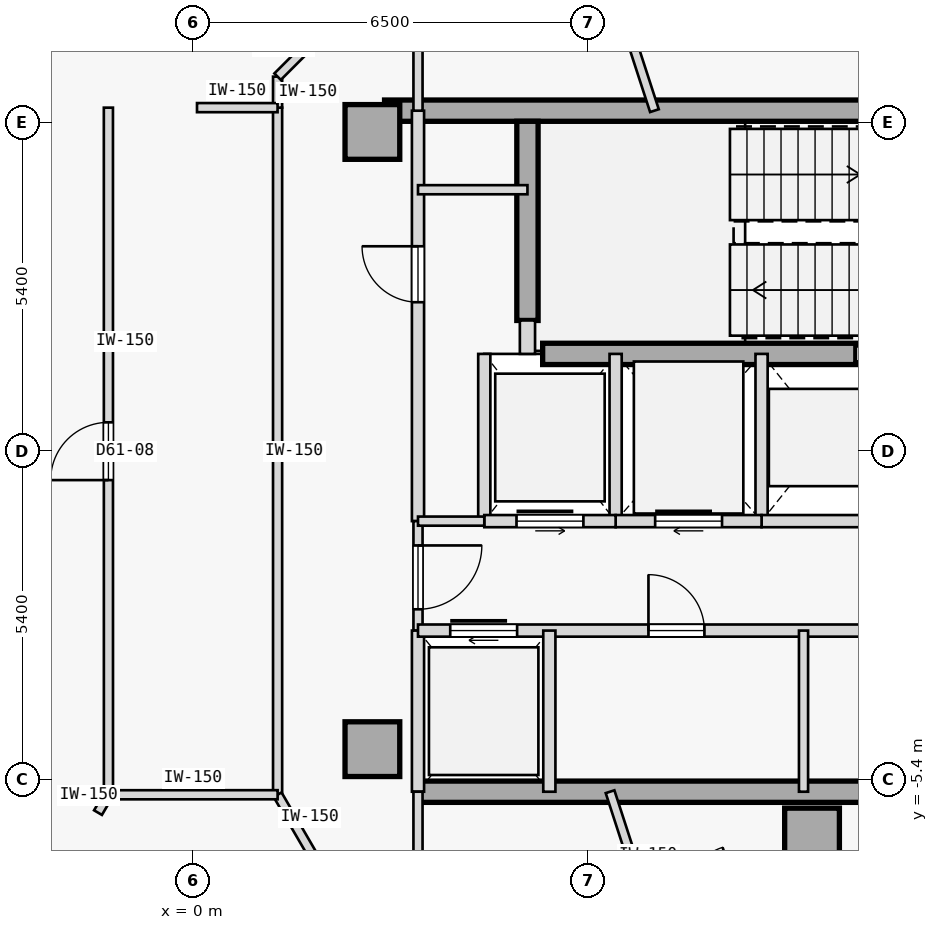
"""IFC4 building model, lengths in metres.
Left out: names, types, materials, properties, quantities, classifications, styles, units other than length and angle.
Written with IfcOpenShell. Run it as: python <this file> out.ifc"""

import sys

from ifc_helpers import new_model, si_unit, direction, frame, frame_2d, origin, origin_2d, place, context, subcontext, project, spatial, rectangle, extrude, element, fill, save


model = new_model("IFC4")
c1 = context("Model", 3, precision=1e-05, world=origin(), true_north=direction((0.0, 1.0)))
c2 = subcontext(c1, "Body", "Model", "MODEL_VIEW")
j1 = project(units=[si_unit("LENGTHUNIT", "METRE"), si_unit("PLANEANGLEUNIT", "RADIAN")], contexts=[c1])
p1 = place(None, origin())
s1 = spatial("IfcSite", under=j1, at=p1, CompositionType="ELEMENT")
p2 = place(p1, origin())
s2 = spatial("IfcBuilding", under=s1, at=p2, CompositionType="ELEMENT")
p3 = place(p2, frame((0.0, 0.0, 231.0)))
s3 = spatial("IfcBuildingStorey", under=s2, at=p3, CompositionType="ELEMENT", Elevation=231.0)
for number, where, z_axis, x_axis in (
    (1, (10.18, -6.32, 0.0), (0.0, 0.0, 1.0), (1.0, 0.0, 0.0)),
    (2, (2.95, -4.9, 0.0), (0.0, 0.0, 1.0), (1.0, 0.0, 0.0)),
    (3, (2.95, 5.25, 0.0), (0.0, 0.0, 1.0), (1.0, 0.0, 0.0)),
):
    element("IfcColumn", number, at=place(p3, frame(where, z_axis=z_axis, x_axis=x_axis)), inside=s3, PredefinedType="COLUMN", context=c2, shape_type="SweptSolid", body=[
        extrude(rectangle(XDim=0.9, YDim=0.9, at=origin_2d()), origin(), (0.0, 0.0, 1.0), 3.35),
    ])
p4 = place(p3, frame((3.15, 5.6, 0.0), z_axis=(0.0, 0.0, 1.0), x_axis=(1.0, 0.0, 0.0)))
e4 = element("IfcWall", 4, at=p4, inside=s3, PredefinedType="SHEAR", context=c2, shape_type="SweptSolid", body=[
    extrude(rectangle(XDim=11.41, YDim=0.35, at=frame_2d((5.705, 0.0))), origin(), (0.0, 0.0, 1.0), 3.125),
])
p5 = place(p3, frame((3.7, -5.6, 0.0), z_axis=(0.0, 0.0, 1.0), x_axis=(1.0, 0.0, 0.0)))
e5 = element("IfcWall", 5, at=p5, inside=s3, PredefinedType="SHEAR", context=c2, shape_type="SweptSolid", body=[
    extrude(rectangle(XDim=10.86, YDim=0.35, at=frame_2d((5.43, 0.0))), origin(), (0.0, 0.0, 1.0), 3.125),
])
p6 = place(p3, frame((5.5, 2.15, 0.0), z_axis=(0.0, 0.0, 1.0), x_axis=(0.0, 1.0, 0.0)))
e6 = element("IfcWall", 6, at=p6, inside=s3, PredefinedType="SHEAR", context=c2, shape_type="SweptSolid", body=[
    extrude(rectangle(XDim=3.275, YDim=0.35, at=frame_2d((1.638, 0.0))), origin(), (0.0, 0.0, 1.0), 3.125),
])
p7 = place(p3, frame((5.75, 1.6, 0.0), z_axis=(0.0, 0.0, 1.0), x_axis=(1.0, 0.0, 0.0)))
e7 = element("IfcWall", 7, at=p7, inside=s3, PredefinedType="SHEAR", context=c2, shape_type="SweptSolid", body=[
    extrude(rectangle(XDim=5.15, YDim=0.35, at=frame_2d((2.575, 0.0))), origin(), (0.0, 0.0, 1.0), 3.125),
])
p8 = place(p3, frame((10.9, 1.6, 0.0), z_axis=(0.0, 0.0, 1.0), x_axis=(1.0, 0.0, 0.0)))
e8 = element("IfcWall", 8, at=p8, inside=s3, PredefinedType="STANDARD", context=c2, shape_type="SweptSolid", body=[
    extrude(rectangle(XDim=3.6, YDim=0.25, at=frame_2d((1.8, 0.0))), origin(), (0.0, 0.0, 1.0), 3.125),
])
p9 = place(p8, frame((1.62, 0.0, 0.0)))
e9 = element("IfcOpeningElement", 9, at=p9, cuts=e8, PredefinedType="OPENING", context=c2, shape_type="SweptSolid", body=[
    extrude(rectangle(XDim=1.05, YDim=2.15, at=frame_2d((0.525, 1.075))), frame((0.0, 0.135, 0.0), z_axis=(0.0, -1.0, 0.0), x_axis=(1.0, 0.0, 0.0)), (0.0, 0.0, 1.0), 0.27),
])
p10 = place(p3, frame((5.5, 1.6, 0.0), z_axis=(0.0, 0.0, 1.0), x_axis=(0.0, 1.0, 0.0)))
e10 = element("IfcWall", 10, at=p10, inside=s3, PredefinedType="STANDARD", context=c2, shape_type="SweptSolid", body=[
    extrude(rectangle(XDim=0.55, YDim=0.25, at=frame_2d((0.275, 0.0))), origin(), (0.0, 0.0, 1.0), 3.125),
])
p11 = place(p3, frame((3.7, -1.15, 0.0), z_axis=(0.0, 0.0, 1.0), x_axis=(0.0, 1.0, 0.0)))
e11 = element("IfcWall", 11, at=p11, inside=s3, PredefinedType="STANDARD", context=c2, shape_type="SweptSolid", body=[
    extrude(rectangle(XDim=6.75, YDim=0.2, at=frame_2d((3.375, 0.0))), origin(), (0.0, 0.0, 1.0), 3.125),
])
p12 = place(p11, frame((3.6, 0.0, 0.0)))
e12 = element("IfcOpeningElement", 12, at=p12, cuts=e11, PredefinedType="OPENING", context=c2, shape_type="SweptSolid", body=[
    extrude(rectangle(XDim=0.92, YDim=2.15, at=frame_2d((0.46, 1.075))), frame((0.0, 0.11, 0.0), z_axis=(0.0, -1.0, 0.0), x_axis=(1.0, 0.0, 0.0)), (0.0, 0.0, 1.0), 0.22),
])
p13 = place(p3, frame((3.7, -2.95, 0.0), z_axis=(0.0, 0.0, 1.0), x_axis=(0.0, 1.0, 0.0)))
e13 = element("IfcWall", 13, at=p13, inside=s3, PredefinedType="PARTITIONING", context=c2, shape_type="SweptSolid", body=[
    extrude(rectangle(XDim=1.8, YDim=0.15, at=frame_2d((0.9, 0.0))), origin(), (0.0, 0.0, 1.0), 3.125),
])
p14 = place(p13, frame((0.35, 0.0, 0.0)))
e14 = element("IfcOpeningElement", 14, at=p14, cuts=e13, PredefinedType="OPENING", context=c2, shape_type="SweptSolid", body=[
    extrude(rectangle(XDim=1.05, YDim=2.18, at=frame_2d((0.525, 1.09))), frame((0.0, 0.085, 0.0), z_axis=(0.0, -1.0, 0.0), x_axis=(1.0, 0.0, 0.0)), (0.0, 0.0, 1.0), 0.17),
])
p15 = place(p3, frame((3.7, -5.6, 0.0), z_axis=(0.0, 0.0, 1.0), x_axis=(0.0, 1.0, 0.0)))
e15 = element("IfcWall", 15, at=p15, inside=s3, PredefinedType="STANDARD", context=c2, shape_type="SweptSolid", body=[
    extrude(rectangle(XDim=2.65, YDim=0.2, at=frame_2d((1.325, 0.0))), origin(), (0.0, 0.0, 1.0), 3.125),
])
p16 = place(p3, frame((9.35, -1.15, 0.0), z_axis=(0.0, 0.0, 1.0), x_axis=(0.0, 1.0, 0.0)))
e16 = element("IfcWall", 16, at=p16, inside=s3, PredefinedType="STANDARD", context=c2, shape_type="SweptSolid", body=[
    extrude(rectangle(XDim=2.75, YDim=0.2, at=frame_2d((1.375, 0.0))), origin(), (0.0, 0.0, 1.0), 3.125),
])
p17 = place(p3, frame((9.35, -1.15, 0.0), z_axis=(0.0, 0.0, 1.0), x_axis=(1.0, 0.0, 0.0)))
e17 = element("IfcWall", 17, at=p17, inside=s3, PredefinedType="STANDARD", context=c2, shape_type="SweptSolid", body=[
    extrude(rectangle(XDim=2.2, YDim=0.2, at=frame_2d((1.1, 0.0))), origin(), (0.0, 0.0, 1.0), 3.125),
])
p18 = place(p3, frame((6.95, -1.15, 0.0), z_axis=(0.0, 0.0, 1.0), x_axis=(0.0, 1.0, 0.0)))
e18 = element("IfcWall", 18, at=p18, inside=s3, PredefinedType="STANDARD", context=c2, shape_type="SweptSolid", body=[
    extrude(rectangle(XDim=2.75, YDim=0.2, at=frame_2d((1.375, 0.0))), origin(), (0.0, 0.0, 1.0), 3.125),
])
p19 = place(p3, frame((6.95, -1.15, 0.0), z_axis=(0.0, 0.0, 1.0), x_axis=(1.0, 0.0, 0.0)))
e19 = element("IfcWall", 19, at=p19, inside=s3, PredefinedType="STANDARD", context=c2, shape_type="SweptSolid", body=[
    extrude(rectangle(XDim=2.4, YDim=0.2, at=frame_2d((1.2, 0.0))), origin(), (0.0, 0.0, 1.0), 3.125),
])
p20 = place(p19, frame((0.65, 0.0, 0.0)))
e20 = element("IfcOpeningElement", 20, at=p20, cuts=e19, PredefinedType="OPENING", context=c2, shape_type="SweptSolid", body=[
    extrude(rectangle(XDim=1.1, YDim=2.15, at=frame_2d((0.55, 1.075))), frame((0.0, 0.11, 0.0), z_axis=(0.0, -1.0, 0.0), x_axis=(1.0, 0.0, 0.0)), (0.0, 0.0, 1.0), 0.22),
])
p21 = place(p3, frame((4.79, -1.15, 0.0), z_axis=(0.0, 0.0, 1.0), x_axis=(0.0, 1.0, 0.0)))
e21 = element("IfcWall", 21, at=p21, inside=s3, PredefinedType="STANDARD", context=c2, shape_type="SweptSolid", body=[
    extrude(rectangle(XDim=2.75, YDim=0.2, at=frame_2d((1.375, 0.0))), origin(), (0.0, 0.0, 1.0), 3.125),
])
p22 = place(p3, frame((4.79, -1.15, 0.0), z_axis=(0.0, 0.0, 1.0), x_axis=(1.0, 0.0, 0.0)))
e22 = element("IfcWall", 22, at=p22, inside=s3, PredefinedType="STANDARD", context=c2, shape_type="SweptSolid", body=[
    extrude(rectangle(XDim=2.16, YDim=0.2, at=frame_2d((1.08, 0.0))), origin(), (0.0, 0.0, 1.0), 3.125),
])
p23 = place(p22, frame((0.53, 0.0, 0.0)))
e23 = element("IfcOpeningElement", 23, at=p23, cuts=e22, PredefinedType="OPENING", context=c2, shape_type="SweptSolid", body=[
    extrude(rectangle(XDim=1.1, YDim=2.15, at=frame_2d((0.55, 1.075))), frame((0.0, 0.11, 0.0), z_axis=(0.0, -1.0, 0.0), x_axis=(1.0, 0.0, 0.0)), (0.0, 0.0, 1.0), 0.22),
])
p24 = place(p3, frame((3.7, -1.15, 0.0), z_axis=(0.0, 0.0, 1.0), x_axis=(1.0, 0.0, 0.0)))
e24 = element("IfcWall", 24, at=p24, inside=s3, PredefinedType="PARTITIONING", context=c2, shape_type="SweptSolid", body=[
    extrude(rectangle(XDim=1.09, YDim=0.15, at=frame_2d((0.545, 0.0))), origin(), (0.0, 0.0, 1.0), 3.125),
])
p25 = place(p3, frame((3.7, -2.95, 0.0), z_axis=(0.0, 0.0, 1.0), x_axis=(1.0, 0.0, 0.0)))
e25 = element("IfcWall", 25, at=p25, inside=s3, PredefinedType="STANDARD", context=c2, shape_type="SweptSolid", body=[
    extrude(rectangle(XDim=10.8, YDim=0.2, at=frame_2d((5.4, 0.0))), origin(), (0.0, 0.0, 1.0), 3.125),
])
p26 = place(p25, frame((0.53, 0.0, 0.0)))
e26 = element("IfcOpeningElement", 26, at=p26, cuts=e25, PredefinedType="OPENING", context=c2, shape_type="SweptSolid", body=[
    extrude(rectangle(XDim=1.1, YDim=2.15, at=frame_2d((0.55, 1.075))), frame((0.0, 0.11, 0.0), z_axis=(0.0, -1.0, 0.0), x_axis=(1.0, 0.0, 0.0)), (0.0, 0.0, 1.0), 0.22),
])
p27 = place(p25, frame((3.79, 0.0, 0.0)))
e27 = element("IfcOpeningElement", 27, at=p27, cuts=e25, PredefinedType="OPENING", context=c2, shape_type="SweptSolid", body=[
    extrude(rectangle(XDim=0.92, YDim=2.15, at=frame_2d((0.46, 1.075))), frame((0.0, 0.11, 0.0), z_axis=(0.0, -1.0, 0.0), x_axis=(1.0, 0.0, 0.0)), (0.0, 0.0, 1.0), 0.22),
])
p28 = place(p25, frame((8.11, 0.0, 0.0)))
e28 = element("IfcOpeningElement", 28, at=p28, cuts=e25, PredefinedType="OPENING", context=c2, shape_type="SweptSolid", body=[
    extrude(rectangle(XDim=0.92, YDim=2.15, at=frame_2d((0.46, 1.075))), frame((0.0, 0.11, 0.0), z_axis=(0.0, -1.0, 0.0), x_axis=(1.0, 0.0, 0.0)), (0.0, 0.0, 1.0), 0.22),
])
p29 = place(p3, frame((5.86, -5.6, 0.0), z_axis=(0.0, 0.0, 1.0), x_axis=(0.0, 1.0, 0.0)))
e29 = element("IfcWall", 29, at=p29, inside=s3, PredefinedType="STANDARD", context=c2, shape_type="SweptSolid", body=[
    extrude(rectangle(XDim=2.65, YDim=0.2, at=frame_2d((1.325, 0.0))), origin(), (0.0, 0.0, 1.0), 3.125),
])
p30 = place(p3, frame((10.04, -5.6, 0.0), z_axis=(0.0, 0.0, 1.0), x_axis=(0.0, 1.0, 0.0)))
e30 = element("IfcWall", 30, at=p30, inside=s3, PredefinedType="PARTITIONING", context=c2, shape_type="SweptSolid", body=[
    extrude(rectangle(XDim=2.65, YDim=0.15, at=frame_2d((1.325, 0.0))), origin(), (0.0, 0.0, 1.0), 3.125),
])
p31 = place(p3, frame((3.7, 4.3, 0.0), z_axis=(0.0, 0.0, 1.0), x_axis=(1.0, 0.0, 0.0)))
e31 = element("IfcWall", 31, at=p31, inside=s3, PredefinedType="PARTITIONING", context=c2, shape_type="SweptSolid", body=[
    extrude(rectangle(XDim=1.8, YDim=0.15, at=frame_2d((0.9, 0.0))), origin(), (0.0, 0.0, 1.0), 3.125),
])
p32 = place(p3, frame((-1.391, -5.65, 0.0), z_axis=(0.0, 0.0, 1.0), x_axis=(-8.6422954e-05, 0.999999996266, 0.0)))
e32 = element("IfcWall", 32, at=p32, inside=s3, PredefinedType="PARTITIONING", context=c2, shape_type="SweptSolid", body=[
    extrude(rectangle(XDim=11.3, YDim=0.15, at=frame_2d((5.65, 0.0))), origin(), (0.0, 0.0, 1.0), 3.125),
])
p33 = place(p32, frame((5.175, 0.0, 0.0)))
e33 = element("IfcOpeningElement", 33, at=p33, cuts=e32, PredefinedType="OPENING", context=c2, shape_type="SweptSolid", body=[
    extrude(rectangle(XDim=0.95, YDim=2.15, at=frame_2d((0.475, 1.075))), frame((0.0, 0.085, 0.0), z_axis=(0.0, -1.0, 0.0), x_axis=(1.0, 0.0, 0.0)), (0.0, 0.0, 1.0), 0.17),
])
p34 = place(p3, frame((1.391, -5.648, 0.0), z_axis=(0.0, 0.0, 1.0), x_axis=(-4.3218947e-05, 0.999999999066, 0.0)))
e34 = element("IfcWall", 34, at=p34, inside=s3, PredefinedType="PARTITIONING", context=c2, shape_type="SweptSolid", body=[
    extrude(rectangle(XDim=11.298, YDim=0.15, at=frame_2d((5.649, 0.0))), origin(), (0.0, 0.0, 1.0), 3.125),
])
p35 = place(p3, frame((3.7, -9.109, 0.0), z_axis=(0.0, 0.0, 1.0), x_axis=(-0.000139130433, 0.999999990321, 0.0)))
e35 = element("IfcWall", 35, at=p35, inside=s3, PredefinedType="PARTITIONING", context=c2, shape_type="SweptSolid", body=[
    extrude(rectangle(XDim=3.51, YDim=0.15, at=frame_2d((1.755, 0.0))), origin(), (0.0, 0.0, 1.0), 3.125),
])
p36 = place(p3, frame((7.588, -7.846, 0.0), z_axis=(0.0, 0.0, 1.0), x_axis=(0.951058013903, 0.309012385174, 0.0)))
e36 = element("IfcWall", 36, at=p36, inside=s3, PredefinedType="PARTITIONING", context=c2, shape_type="SweptSolid", body=[
    extrude(rectangle(XDim=7.267, YDim=0.15, at=frame_2d((3.634, 0.0))), origin(), (0.0, 0.0, 1.0), 3.125),
])
p37 = place(p36, frame((0.557, 0.0, 0.0)))
e37 = element("IfcOpeningElement", 37, at=p37, cuts=e36, PredefinedType="OPENING", context=c2, shape_type="SweptSolid", body=[
    extrude(rectangle(XDim=0.92, YDim=2.15, at=frame_2d((0.46, 1.075))), frame((0.0, 0.085, 0.0), z_axis=(0.0, -1.0, 0.0), x_axis=(1.0, 0.0, 0.0)), (0.0, 0.0, 1.0), 0.17),
])
p38 = place(p3, frame((-1.562, -5.944, 0.0), z_axis=(0.0, 0.0, 1.0), x_axis=(0.505387839696, 0.862892305845, 0.0)))
e38 = element("IfcWall", 38, at=p38, inside=s3, PredefinedType="PARTITIONING", context=c2, shape_type="SweptSolid", body=[
    extrude(rectangle(XDim=0.34, YDim=0.15, at=frame_2d((0.17, 0.0))), origin(), (0.0, 0.0, 1.0), 3.125),
])
p39 = place(p3, frame((1.391, -5.649, 0.0), z_axis=(0.0, 0.0, 1.0), x_axis=(0.502522642426, -0.864564048437, 0.0)))
e39 = element("IfcWall", 39, at=p39, inside=s3, PredefinedType="PARTITIONING", context=c2, shape_type="SweptSolid", body=[
    extrude(rectangle(XDim=1.171, YDim=0.15, at=frame_2d((0.586, 0.0))), origin(), (0.0, 0.0, 1.0), 3.125),
])
p40 = place(p3, frame((3.7, 5.6, 0.0), z_axis=(0.0, 0.0, 1.0), x_axis=(-0.000123839008, 0.999999992332, 0.0)))
e40 = element("IfcWall", 40, at=p40, inside=s3, PredefinedType="PARTITIONING", context=c2, shape_type="SweptSolid", body=[
    extrude(rectangle(XDim=5.914, YDim=0.15, at=frame_2d((2.957, 0.0))), origin(), (0.0, 0.0, 1.0), 2.675),
])
p41 = place(p40, frame((2.497, 0.0, 0.0)))
e41 = element("IfcOpeningElement", 41, at=p41, cuts=e40, PredefinedType="OPENING", context=c2, shape_type="SweptSolid", body=[
    extrude(rectangle(XDim=0.92, YDim=2.15, at=frame_2d((0.46, 1.075))), frame((0.0, 0.085, 0.0), z_axis=(0.0, -1.0, 0.0), x_axis=(1.0, 0.0, 0.0)), (0.0, 0.0, 1.0), 0.17),
])
p42 = place(p3, frame((1.391, 5.649, 0.0), z_axis=(0.0, 0.0, 1.0), x_axis=(0.000957395444, 0.999999541697, 0.0)))
e42 = element("IfcWall", 42, at=p42, inside=s3, PredefinedType="PARTITIONING", context=c2, shape_type="SweptSolid", body=[
    extrude(rectangle(XDim=0.51, YDim=0.15, at=frame_2d((0.255, 0.0))), origin(), (0.0, 0.0, 1.0), 3.125),
])
p43 = place(p3, frame((1.391, 6.159, 0.0), z_axis=(0.0, 0.0, 1.0), x_axis=(0.707106781187, 0.707106781187, 0.0)))
e43 = element("IfcWall", 43, at=p43, inside=s3, PredefinedType="PARTITIONING", context=c2, shape_type="SweptSolid", body=[
    extrude(rectangle(XDim=0.833, YDim=0.15, at=frame_2d((0.417, 0.0))), origin(), (0.0, 0.0, 1.0), 3.125),
])
p44 = place(p3, frame((-1.391, -5.65, 0.0), z_axis=(0.0, 0.0, 1.0), x_axis=(0.999999965344, 0.000263273356, 0.0)))
e44 = element("IfcWall", 44, at=p44, inside=s3, PredefinedType="PARTITIONING", context=c2, shape_type="SweptSolid", body=[
    extrude(rectangle(XDim=2.782, YDim=0.15, at=frame_2d((1.391, 0.0))), origin(), (0.0, 0.0, 1.0), 3.125),
])
p45 = place(p3, frame((0.066, 5.65, 0.0), z_axis=(0.0, 0.0, 1.0), x_axis=(0.999999932094, -0.000368527707, 0.0)))
e45 = element("IfcWall", 45, at=p45, inside=s3, PredefinedType="PARTITIONING", context=c2, shape_type="SweptSolid", body=[
    extrude(rectangle(XDim=1.325, YDim=0.15, at=frame_2d((0.663, 0.0))), origin(), (0.0, 0.0, 1.0), 3.125),
])
p46 = place(p3, frame((7.588, -7.846, 0.0), z_axis=(0.0, 0.0, 1.0), x_axis=(-0.309055688452, 0.951043942957, 0.0)))
e46 = element("IfcWall", 46, at=p46, inside=s3, PredefinedType="PARTITIONING", context=c2, shape_type="SweptSolid", body=[
    extrude(rectangle(XDim=2.362, YDim=0.15, at=frame_2d((1.181, 0.0))), origin(), (0.0, 0.0, 1.0), 3.125),
])
p47 = place(p3, frame((7.588, 5.6, 0.0), z_axis=(0.0, 0.0, 1.0), x_axis=(-0.309018946982, 0.951055881852, 0.0)))
e47 = element("IfcWall", 47, at=p47, inside=s3, PredefinedType="PARTITIONING", context=c2, shape_type="SweptSolid", body=[
    extrude(rectangle(XDim=6.826, YDim=0.15, at=frame_2d((3.413, 0.0))), origin(), (0.0, 0.0, 1.0), 3.125),
])
p48 = place(p14, frame((1.05, 0.0, 0.0), z_axis=(0.0, 0.0, 1.0), x_axis=(-1.0, 0.0, 0.0)))
e48 = element("IfcDoor", 48, at=p48, inside=s3, OperationType="SINGLE_SWING_RIGHT", PredefinedType="DOOR", context=c2, shape_type="SweptSolid", body=[
    extrude(rectangle(XDim=1.05, YDim=2.18, at=frame_2d((0.525, 1.09))), frame((0.0, 0.025, 0.0), z_axis=(0.0, -1.0, 0.0), x_axis=(1.0, 0.0, 0.0)), (0.0, 0.0, 1.0), 0.05),
])
fill(e14, e48)
p49 = place(p20, origin())
e49 = element("IfcDoor", 49, at=p49, inside=s3, OperationType="SLIDING_TO_RIGHT", PredefinedType="DOOR", context=c2, shape_type="SweptSolid", body=[
    extrude(rectangle(XDim=1.1, YDim=2.15, at=frame_2d((0.55, 1.075))), frame((0.0, 0.025, 0.0), z_axis=(0.0, -1.0, 0.0), x_axis=(1.0, 0.0, 0.0)), (0.0, 0.0, 1.0), 0.05),
])
fill(e20, e49)
p50 = place(p23, origin())
e50 = element("IfcDoor", 50, at=p50, inside=s3, OperationType="SLIDING_TO_LEFT", PredefinedType="DOOR", context=c2, shape_type="SweptSolid", body=[
    extrude(rectangle(XDim=1.1, YDim=2.15, at=frame_2d((0.55, 1.075))), frame((0.0, 0.025, 0.0), z_axis=(0.0, -1.0, 0.0), x_axis=(1.0, 0.0, 0.0)), (0.0, 0.0, 1.0), 0.05),
])
fill(e23, e50)
p51 = place(p26, origin())
e51 = element("IfcDoor", 51, at=p51, inside=s3, OperationType="SLIDING_TO_RIGHT", PredefinedType="DOOR", context=c2, shape_type="SweptSolid", body=[
    extrude(rectangle(XDim=1.1, YDim=2.15, at=frame_2d((0.55, 1.075))), frame((0.0, 0.025, 0.0), z_axis=(0.0, -1.0, 0.0), x_axis=(1.0, 0.0, 0.0)), (0.0, 0.0, 1.0), 0.05),
])
fill(e26, e51)
p52 = place(p27, origin())
e52 = element("IfcDoor", 52, at=p52, inside=s3, OperationType="SINGLE_SWING_LEFT", PredefinedType="DOOR", context=c2, shape_type="SweptSolid", body=[
    extrude(rectangle(XDim=0.92, YDim=2.15, at=frame_2d((0.46, 1.075))), frame((0.0, 0.025, 0.0), z_axis=(0.0, -1.0, 0.0), x_axis=(1.0, 0.0, 0.0)), (0.0, 0.0, 1.0), 0.05),
])
fill(e27, e52)
p53 = place(p12, origin())
e53 = element("IfcDoor", 53, at=p53, inside=s3, OperationType="SINGLE_SWING_RIGHT", PredefinedType="DOOR", context=c2, shape_type="SweptSolid", body=[
    extrude(rectangle(XDim=0.92, YDim=2.15, at=frame_2d((0.46, 1.075))), frame((0.0, 0.025, 0.0), z_axis=(0.0, -1.0, 0.0), x_axis=(1.0, 0.0, 0.0)), (0.0, 0.0, 1.0), 0.05),
])
fill(e12, e53)
p54 = place(p33, origin())
e54 = element("IfcDoor", 54, at=p54, inside=s3, OperationType="SINGLE_SWING_LEFT", PredefinedType="DOOR", context=c2, shape_type="SweptSolid", body=[
    extrude(rectangle(XDim=0.95, YDim=2.15, at=frame_2d((0.475, 1.075))), frame((0.0, 0.025, 0.0), z_axis=(0.0, -1.0, 0.0), x_axis=(1.0, 0.0, 0.0)), (0.0, 0.0, 1.0), 0.05),
])
fill(e33, e54)
save(model, sys.argv[1])
